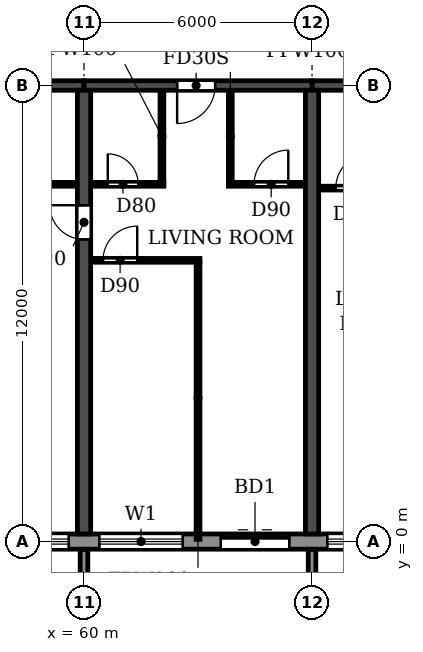
"""IFC4 building model, lengths in metres.
Left out: names, types, materials, properties, quantities, classifications, styles, units other than length and angle.
Written with IfcOpenShell. Run it as: python <this file> out.ifc"""

import sys

from ifc_helpers import new_model, si_unit, direction, frame, frame_2d, origin, place, context, subcontext, project, spatial, polyline, rectangle, outline, extrude, source, transform, mapped, element, fill, save


model = new_model("IFC4")
c1 = context("Model", 3, precision=1e-05, world=origin(), true_north=direction((0.0, 1.0)))
c2 = subcontext(c1, "Body", "Model", "MODEL_VIEW")
j1 = project(units=[si_unit("LENGTHUNIT", "METRE"), si_unit("PLANEANGLEUNIT", "RADIAN")], contexts=[c1])
p1 = place(None, origin())
s1 = spatial("IfcSite", under=j1, at=p1, CompositionType="ELEMENT")
p2 = place(p1, origin())
s2 = spatial("IfcBuilding", under=s1, at=p2, CompositionType="ELEMENT")
p3 = place(p2, frame((0.0, 0.0, 112.5)))
s3 = spatial("IfcBuildingStorey", under=s2, at=p3, CompositionType="ELEMENT", Elevation=112.5)
p4 = place(p3, frame((60.0, 0.2, 0.0), z_axis=(0.0, 0.0, 1.0), x_axis=(0.0, 1.0, 0.0)))
e1 = element("IfcWall", 1, at=p4, inside=s3, PredefinedType="SHEAR", context=c2, shape_type="SweptSolid", body=[
    extrude(rectangle(XDim=11.675, YDim=0.35, at=frame_2d((5.837, 0.0))), origin(), (0.0, 0.0, 1.0), 2.95),
])
p5 = place(p4, frame((7.75, 0.0, 0.0)))
e2 = element("IfcOpeningElement", 2, at=p5, cuts=e1, PredefinedType="OPENING", context=c2, shape_type="SweptSolid", body=[
    extrude(rectangle(XDim=0.9, YDim=2.1, at=frame_2d((0.45, 1.05))), frame((0.0, 0.185, 0.0), z_axis=(0.0, -1.0, 0.0), x_axis=(1.0, 0.0, 0.0)), (0.0, 0.0, 1.0), 0.37),
])
p6 = place(p3, frame((66.0, 0.2, 0.0), z_axis=(0.0, 0.0, 1.0), x_axis=(0.0, 1.0, 0.0)))
e3 = element("IfcWall", 3, at=p6, inside=s3, PredefinedType="SHEAR", context=c2, shape_type="SweptSolid", body=[
    extrude(rectangle(XDim=11.675, YDim=0.35, at=frame_2d((5.837, 0.0))), origin(), (0.0, 0.0, 1.0), 2.95),
])
p7 = place(p3, frame((54.0, 12.0, 0.0), z_axis=(0.0, 0.0, 1.0), x_axis=(1.0, 0.0, 0.0)))
e4 = element("IfcWall", 4, at=p7, inside=s3, PredefinedType="SHEAR", context=c2, shape_type="SweptSolid", body=[
    extrude(rectangle(XDim=6.0, YDim=0.25, at=frame_2d((3.0, 0.0))), origin(), (0.0, 0.0, 1.0), 2.35),
])
p8 = place(p3, frame((60.0, 12.0, 0.0), z_axis=(0.0, 0.0, 1.0), x_axis=(1.0, 0.0, 0.0)))
e5 = element("IfcWall", 5, at=p8, inside=s3, PredefinedType="SHEAR", context=c2, shape_type="SweptSolid", body=[
    extrude(rectangle(XDim=6.0, YDim=0.25, at=frame_2d((3.0, 0.0))), origin(), (0.0, 0.0, 1.0), 2.35),
])
p9 = place(p8, frame((2.45, 0.0, 0.0)))
e6 = element("IfcOpeningElement", 6, at=p9, cuts=e5, PredefinedType="OPENING", context=c2, shape_type="SweptSolid", body=[
    extrude(rectangle(XDim=1.0, YDim=2.1, at=frame_2d((0.5, 1.05))), frame((0.0, 0.135, 0.0), z_axis=(0.0, -1.0, 0.0), x_axis=(1.0, 0.0, 0.0)), (0.0, 0.0, 1.0), 0.27),
])
p10 = place(p3, frame((66.0, 12.0, 0.0), z_axis=(0.0, 0.0, 1.0), x_axis=(1.0, 0.0, 0.0)))
e7 = element("IfcWall", 7, at=p10, inside=s3, PredefinedType="SHEAR", context=c2, shape_type="SweptSolid", body=[
    extrude(rectangle(XDim=6.0, YDim=0.25, at=frame_2d((3.0, 0.0))), origin(), (0.0, 0.0, 1.0), 2.35),
])
p11 = place(p10, frame((2.55, 0.0, 0.0)))
e8 = element("IfcOpeningElement", 8, at=p11, cuts=e7, PredefinedType="OPENING", context=c2, shape_type="SweptSolid", body=[
    extrude(rectangle(XDim=1.0, YDim=2.1, at=frame_2d((0.5, 1.05))), frame((0.0, 0.135, 0.0), z_axis=(0.0, -1.0, 0.0), x_axis=(1.0, 0.0, 0.0)), (0.0, 0.0, 1.0), 0.27),
])
p12 = place(p3, frame((16.683, 0.0, 0.0), z_axis=(0.0, 0.0, 1.0), x_axis=(1.0, 0.0, 0.0)))
e9 = element("IfcWall", 9, at=p12, inside=s3, PredefinedType="STANDARD", context=c2, shape_type="SweptSolid", body=[
    extrude(rectangle(XDim=68.634, YDim=0.4, at=frame_2d((34.317, 0.0))), origin(), (0.0, 0.0, 1.0), 2.95),
])
p13 = place(p12, frame((1.717, 0.0, 0.9)))
e10 = element("IfcOpeningElement", 10, at=p13, cuts=e9, PredefinedType="OPENING", context=c2, shape_type="SweptSolid", body=[
    extrude(rectangle(XDim=2.2, YDim=1.5, at=frame_2d((1.1, 0.75))), frame((0.0, 0.21, 0.0), z_axis=(0.0, -1.0, 0.0), x_axis=(1.0, 0.0, 0.0)), (0.0, 0.0, 1.0), 0.42),
])
p14 = place(p12, frame((4.717, 0.0, 0.9)))
e11 = element("IfcOpeningElement", 11, at=p14, cuts=e9, PredefinedType="OPENING", context=c2, shape_type="SweptSolid", body=[
    extrude(rectangle(XDim=2.2, YDim=1.5, at=frame_2d((1.1, 0.75))), frame((0.0, 0.21, 0.0), z_axis=(0.0, -1.0, 0.0), x_axis=(1.0, 0.0, 0.0)), (0.0, 0.0, 1.0), 0.42),
])
p15 = place(p12, frame((7.717, 0.0, 0.9)))
e12 = element("IfcOpeningElement", 12, at=p15, cuts=e9, PredefinedType="OPENING", context=c2, shape_type="SweptSolid", body=[
    extrude(rectangle(XDim=2.2, YDim=1.5, at=frame_2d((1.1, 0.75))), frame((0.0, 0.21, 0.0), z_axis=(0.0, -1.0, 0.0), x_axis=(1.0, 0.0, 0.0)), (0.0, 0.0, 1.0), 0.42),
])
p16 = place(p12, frame((10.917, 0.0, 0.0)))
e13 = element("IfcOpeningElement", 13, at=p16, cuts=e9, PredefinedType="OPENING", context=c2, shape_type="SweptSolid", body=[
    extrude(rectangle(XDim=1.8, YDim=2.4, at=frame_2d((0.9, 1.2))), frame((0.0, 0.21, 0.0), z_axis=(0.0, -1.0, 0.0), x_axis=(1.0, 0.0, 0.0)), (0.0, 0.0, 1.0), 0.42),
])
p17 = place(p12, frame((13.717, 0.0, 0.9)))
e14 = element("IfcOpeningElement", 14, at=p17, cuts=e9, PredefinedType="OPENING", context=c2, shape_type="SweptSolid", body=[
    extrude(rectangle(XDim=2.2, YDim=1.5, at=frame_2d((1.1, 0.75))), frame((0.0, 0.21, 0.0), z_axis=(0.0, -1.0, 0.0), x_axis=(1.0, 0.0, 0.0)), (0.0, 0.0, 1.0), 0.42),
])
p18 = place(p12, frame((16.717, 0.0, 0.9)))
e15 = element("IfcOpeningElement", 15, at=p18, cuts=e9, PredefinedType="OPENING", context=c2, shape_type="SweptSolid", body=[
    extrude(rectangle(XDim=2.2, YDim=1.5, at=frame_2d((1.1, 0.75))), frame((0.0, 0.21, 0.0), z_axis=(0.0, -1.0, 0.0), x_axis=(1.0, 0.0, 0.0)), (0.0, 0.0, 1.0), 0.42),
])
p19 = place(p12, frame((19.717, 0.0, 0.9)))
e16 = element("IfcOpeningElement", 16, at=p19, cuts=e9, PredefinedType="OPENING", context=c2, shape_type="SweptSolid", body=[
    extrude(rectangle(XDim=2.2, YDim=1.5, at=frame_2d((1.1, 0.75))), frame((0.0, 0.21, 0.0), z_axis=(0.0, -1.0, 0.0), x_axis=(1.0, 0.0, 0.0)), (0.0, 0.0, 1.0), 0.42),
])
p20 = place(p12, frame((22.717, 0.0, 0.9)))
e17 = element("IfcOpeningElement", 17, at=p20, cuts=e9, PredefinedType="OPENING", context=c2, shape_type="SweptSolid", body=[
    extrude(rectangle(XDim=2.2, YDim=1.5, at=frame_2d((1.1, 0.75))), frame((0.0, 0.21, 0.0), z_axis=(0.0, -1.0, 0.0), x_axis=(1.0, 0.0, 0.0)), (0.0, 0.0, 1.0), 0.42),
])
p21 = place(p12, frame((25.717, 0.0, 0.9)))
e18 = element("IfcOpeningElement", 18, at=p21, cuts=e9, PredefinedType="OPENING", context=c2, shape_type="SweptSolid", body=[
    extrude(rectangle(XDim=2.2, YDim=1.5, at=frame_2d((1.1, 0.75))), frame((0.0, 0.21, 0.0), z_axis=(0.0, -1.0, 0.0), x_axis=(1.0, 0.0, 0.0)), (0.0, 0.0, 1.0), 0.42),
])
p22 = place(p12, frame((28.717, 0.0, 0.9)))
e19 = element("IfcOpeningElement", 19, at=p22, cuts=e9, PredefinedType="OPENING", context=c2, shape_type="SweptSolid", body=[
    extrude(rectangle(XDim=2.2, YDim=1.5, at=frame_2d((1.1, 0.75))), frame((0.0, 0.21, 0.0), z_axis=(0.0, -1.0, 0.0), x_axis=(1.0, 0.0, 0.0)), (0.0, 0.0, 1.0), 0.42),
])
p23 = place(p12, frame((31.917, 0.0, 0.0)))
e20 = element("IfcOpeningElement", 20, at=p23, cuts=e9, PredefinedType="OPENING", context=c2, shape_type="SweptSolid", body=[
    extrude(rectangle(XDim=1.8, YDim=2.4, at=frame_2d((0.9, 1.2))), frame((0.0, 0.21, 0.0), z_axis=(0.0, -1.0, 0.0), x_axis=(1.0, 0.0, 0.0)), (0.0, 0.0, 1.0), 0.42),
])
p24 = place(p12, frame((34.717, 0.0, 0.9)))
e21 = element("IfcOpeningElement", 21, at=p24, cuts=e9, PredefinedType="OPENING", context=c2, shape_type="SweptSolid", body=[
    extrude(rectangle(XDim=2.2, YDim=1.5, at=frame_2d((1.1, 0.75))), frame((0.0, 0.21, 0.0), z_axis=(0.0, -1.0, 0.0), x_axis=(1.0, 0.0, 0.0)), (0.0, 0.0, 1.0), 0.42),
])
p25 = place(p12, frame((37.717, 0.0, 0.9)))
e22 = element("IfcOpeningElement", 22, at=p25, cuts=e9, PredefinedType="OPENING", context=c2, shape_type="SweptSolid", body=[
    extrude(rectangle(XDim=2.2, YDim=1.5, at=frame_2d((1.1, 0.75))), frame((0.0, 0.21, 0.0), z_axis=(0.0, -1.0, 0.0), x_axis=(1.0, 0.0, 0.0)), (0.0, 0.0, 1.0), 0.42),
])
p26 = place(p12, frame((40.717, 0.0, 0.9)))
e23 = element("IfcOpeningElement", 23, at=p26, cuts=e9, PredefinedType="OPENING", context=c2, shape_type="SweptSolid", body=[
    extrude(rectangle(XDim=2.2, YDim=1.5, at=frame_2d((1.1, 0.75))), frame((0.0, 0.21, 0.0), z_axis=(0.0, -1.0, 0.0), x_axis=(1.0, 0.0, 0.0)), (0.0, 0.0, 1.0), 0.42),
])
p27 = place(p12, frame((43.717, 0.0, 0.9)))
e24 = element("IfcOpeningElement", 24, at=p27, cuts=e9, PredefinedType="OPENING", context=c2, shape_type="SweptSolid", body=[
    extrude(rectangle(XDim=2.2, YDim=1.5, at=frame_2d((1.1, 0.75))), frame((0.0, 0.21, 0.0), z_axis=(0.0, -1.0, 0.0), x_axis=(1.0, 0.0, 0.0)), (0.0, 0.0, 1.0), 0.42),
])
p28 = place(p12, frame((46.917, 0.0, 0.0)))
e25 = element("IfcOpeningElement", 25, at=p28, cuts=e9, PredefinedType="OPENING", context=c2, shape_type="SweptSolid", body=[
    extrude(rectangle(XDim=1.8, YDim=2.4, at=frame_2d((0.9, 1.2))), frame((0.0, 0.21, 0.0), z_axis=(0.0, -1.0, 0.0), x_axis=(1.0, 0.0, 0.0)), (0.0, 0.0, 1.0), 0.42),
])
p29 = place(p12, frame((49.717, 0.0, 0.9)))
e26 = element("IfcOpeningElement", 26, at=p29, cuts=e9, PredefinedType="OPENING", context=c2, shape_type="SweptSolid", body=[
    extrude(rectangle(XDim=2.2, YDim=1.5, at=frame_2d((1.1, 0.75))), frame((0.0, 0.21, 0.0), z_axis=(0.0, -1.0, 0.0), x_axis=(1.0, 0.0, 0.0)), (0.0, 0.0, 1.0), 0.42),
])
p30 = place(p12, frame((52.717, 0.0, 0.9)))
e27 = element("IfcOpeningElement", 27, at=p30, cuts=e9, PredefinedType="OPENING", context=c2, shape_type="SweptSolid", body=[
    extrude(rectangle(XDim=2.2, YDim=1.5, at=frame_2d((1.1, 0.75))), frame((0.0, 0.21, 0.0), z_axis=(0.0, -1.0, 0.0), x_axis=(1.0, 0.0, 0.0)), (0.0, 0.0, 1.0), 0.42),
])
p31 = place(p12, frame((55.717, 0.0, 0.9)))
e28 = element("IfcOpeningElement", 28, at=p31, cuts=e9, PredefinedType="OPENING", context=c2, shape_type="SweptSolid", body=[
    extrude(rectangle(XDim=2.2, YDim=1.5, at=frame_2d((1.1, 0.75))), frame((0.0, 0.21, 0.0), z_axis=(0.0, -1.0, 0.0), x_axis=(1.0, 0.0, 0.0)), (0.0, 0.0, 1.0), 0.42),
])
p32 = place(p12, frame((58.717, 0.0, 0.9)))
e29 = element("IfcOpeningElement", 29, at=p32, cuts=e9, PredefinedType="OPENING", context=c2, shape_type="SweptSolid", body=[
    extrude(rectangle(XDim=2.2, YDim=1.5, at=frame_2d((1.1, 0.75))), frame((0.0, 0.21, 0.0), z_axis=(0.0, -1.0, 0.0), x_axis=(1.0, 0.0, 0.0)), (0.0, 0.0, 1.0), 0.42),
])
p33 = place(p12, frame((61.717, 0.0, 0.9)))
e30 = element("IfcOpeningElement", 30, at=p33, cuts=e9, PredefinedType="OPENING", context=c2, shape_type="SweptSolid", body=[
    extrude(rectangle(XDim=2.2, YDim=1.5, at=frame_2d((1.1, 0.75))), frame((0.0, 0.21, 0.0), z_axis=(0.0, -1.0, 0.0), x_axis=(1.0, 0.0, 0.0)), (0.0, 0.0, 1.0), 0.42),
])
p34 = place(p12, frame((64.717, 0.0, 0.9)))
e31 = element("IfcOpeningElement", 31, at=p34, cuts=e9, PredefinedType="OPENING", context=c2, shape_type="SweptSolid", body=[
    extrude(rectangle(XDim=2.2, YDim=1.5, at=frame_2d((1.1, 0.75))), frame((0.0, 0.21, 0.0), z_axis=(0.0, -1.0, 0.0), x_axis=(1.0, 0.0, 0.0)), (0.0, 0.0, 1.0), 0.42),
])
m1 = source(origin(), c2, "Body", "SweptSolid", [
    extrude(outline(polyline([(0.0, 0.0), (0.2, 0.0), (0.2, 1.65), (0.0, 1.65), (0.0, 0.0)])), origin(), (0.0, 0.0, 1.0), 3.1),
])
for number, where in (
    (32, (59.9, -1.85, 0.0)),
    (33, (65.9, -1.85, 0.0)),
):
    element("IfcWall", number, at=place(p3, frame(where)), inside=s3, PredefinedType="STANDARD", context=c2, shape_type="MappedRepresentation", body=[
        mapped(m1, transform((0.0, 0.0, 0.0))),
    ])
p35 = place(p3, frame((60.185, 7.4, 0.0), z_axis=(0.0, 0.0, 1.0), x_axis=(1.0, 0.0, 0.0)))
e34 = element("IfcWall", 34, at=p35, inside=s3, PredefinedType="PARTITIONING", context=c2, shape_type="SweptSolid", body=[
    extrude(rectangle(XDim=2.865, YDim=0.1, at=frame_2d((1.433, 0.0))), origin(), (0.0, 0.0, 1.0), 2.95),
])
p36 = place(p35, frame((0.315, 0.0, 0.0)))
e35 = element("IfcOpeningElement", 35, at=p36, cuts=e34, PredefinedType="OPENING", context=c2, shape_type="SweptSolid", body=[
    extrude(rectangle(XDim=0.9, YDim=2.1, at=frame_2d((0.45, 1.05))), frame((0.0, 0.06, 0.0), z_axis=(0.0, -1.0, 0.0), x_axis=(1.0, 0.0, 0.0)), (0.0, 0.0, 1.0), 0.12),
])
p37 = place(p3, frame((66.185, 9.3, 0.0), z_axis=(0.0, 0.0, 1.0), x_axis=(1.0, 0.0, 0.0)))
e36 = element("IfcWall", 36, at=p37, inside=s3, PredefinedType="PARTITIONING", context=c2, shape_type="SweptSolid", body=[
    extrude(rectangle(XDim=2.015, YDim=0.1, at=frame_2d((1.007, 0.0))), origin(), (0.0, 0.0, 1.0), 2.95),
])
p38 = place(p37, frame((0.44, 0.0, 0.0)))
e37 = element("IfcOpeningElement", 37, at=p38, cuts=e36, PredefinedType="OPENING", context=c2, shape_type="SweptSolid", body=[
    extrude(rectangle(XDim=0.9, YDim=2.1, at=frame_2d((0.45, 1.05))), frame((0.0, 0.06, 0.0), z_axis=(0.0, -1.0, 0.0), x_axis=(1.0, 0.0, 0.0)), (0.0, 0.0, 1.0), 0.12),
])
p39 = place(p3, frame((57.1, 9.4, 0.0), z_axis=(0.0, 0.0, 1.0), x_axis=(1.0, 0.0, 0.0)))
e38 = element("IfcWall", 38, at=p39, inside=s3, PredefinedType="PARTITIONING", context=c2, shape_type="SweptSolid", body=[
    extrude(rectangle(XDim=2.715, YDim=0.1, at=frame_2d((1.357, 0.0))), origin(), (0.0, 0.0, 1.0), 2.95),
])
p40 = place(p39, frame((1.0, 0.0, 0.0)))
e39 = element("IfcOpeningElement", 39, at=p40, cuts=e38, PredefinedType="OPENING", context=c2, shape_type="SweptSolid", body=[
    extrude(rectangle(XDim=0.8, YDim=2.1, at=frame_2d((0.4, 1.05))), frame((0.0, 0.06, 0.0), z_axis=(0.0, -1.0, 0.0), x_axis=(1.0, 0.0, 0.0)), (0.0, 0.0, 1.0), 0.12),
])
p41 = place(p3, frame((60.185, 9.4, 0.0), z_axis=(0.0, 0.0, 1.0), x_axis=(1.0, 0.0, 0.0)))
e40 = element("IfcWall", 40, at=p41, inside=s3, PredefinedType="PARTITIONING", context=c2, shape_type="SweptSolid", body=[
    extrude(rectangle(XDim=1.915, YDim=0.1, at=frame_2d((0.958, 0.0))), origin(), (0.0, 0.0, 1.0), 2.95),
])
p42 = place(p41, frame((0.44, 0.0, 0.0)))
e41 = element("IfcOpeningElement", 41, at=p42, cuts=e40, PredefinedType="OPENING", context=c2, shape_type="SweptSolid", body=[
    extrude(rectangle(XDim=0.8, YDim=2.1, at=frame_2d((0.4, 1.05))), frame((0.0, 0.06, 0.0), z_axis=(0.0, -1.0, 0.0), x_axis=(1.0, 0.0, 0.0)), (0.0, 0.0, 1.0), 0.12),
])
p43 = place(p3, frame((63.8, 9.4, 0.0), z_axis=(0.0, 0.0, 1.0), x_axis=(1.0, 0.0, 0.0)))
e42 = element("IfcWall", 42, at=p43, inside=s3, PredefinedType="PARTITIONING", context=c2, shape_type="SweptSolid", body=[
    extrude(rectangle(XDim=2.015, YDim=0.1, at=frame_2d((1.007, 0.0))), origin(), (0.0, 0.0, 1.0), 2.95),
])
p44 = place(p43, frame((0.675, 0.0, 0.0)))
e43 = element("IfcOpeningElement", 43, at=p44, cuts=e42, PredefinedType="OPENING", context=c2, shape_type="SweptSolid", body=[
    extrude(rectangle(XDim=0.9, YDim=2.1, at=frame_2d((0.45, 1.05))), frame((0.0, 0.06, 0.0), z_axis=(0.0, -1.0, 0.0), x_axis=(1.0, 0.0, 0.0)), (0.0, 0.0, 1.0), 0.12),
])
p45 = place(p3, frame((62.05, 9.45, 0.0), z_axis=(0.0, 0.0, 1.0), x_axis=(0.0, 1.0, 0.0)))
e44 = element("IfcWall", 44, at=p45, inside=s3, PredefinedType="PARTITIONING", context=c2, shape_type="SweptSolid", body=[
    extrude(rectangle(XDim=2.415, YDim=0.1, at=frame_2d((1.208, 0.0))), origin(), (0.0, 0.0, 1.0), 2.95),
])
p46 = place(p3, frame((63.0, 0.06, 0.0), z_axis=(0.0, 0.0, 1.0), x_axis=(0.0, 1.0, 0.0)))
e45 = element("IfcWall", 45, at=p46, inside=s3, PredefinedType="PARTITIONING", context=c2, shape_type="SweptSolid", body=[
    extrude(rectangle(XDim=7.29, YDim=0.1, at=frame_2d((3.645, 0.0))), origin(), (0.0, 0.0, 1.0), 2.95),
])
p47 = place(p3, frame((63.85, 9.45, 0.0), z_axis=(0.0, 0.0, 1.0), x_axis=(0.0, 1.0, 0.0)))
e46 = element("IfcWall", 46, at=p47, inside=s3, PredefinedType="PARTITIONING", context=c2, shape_type="SweptSolid", body=[
    extrude(rectangle(XDim=2.415, YDim=0.1, at=frame_2d((1.208, 0.0))), origin(), (0.0, 0.0, 1.0), 2.95),
])
p48 = place(p26, origin())
e47 = element("IfcWindow", 47, at=p48, inside=s3, PartitioningType="DOUBLE_PANEL_HORIZONTAL", PredefinedType="WINDOW", context=c2, shape_type="SweptSolid", body=[
    extrude(rectangle(XDim=2.2, YDim=1.5, at=frame_2d((1.1, 0.75))), frame((0.0, 0.03, 0.0), z_axis=(0.0, -1.0, 0.0), x_axis=(1.0, 0.0, 0.0)), (0.0, 0.0, 1.0), 0.06),
])
fill(e23, e47)
p49 = place(p27, origin())
e48 = element("IfcWindow", 48, at=p49, inside=s3, PartitioningType="DOUBLE_PANEL_HORIZONTAL", PredefinedType="WINDOW", context=c2, shape_type="SweptSolid", body=[
    extrude(rectangle(XDim=2.2, YDim=1.5, at=frame_2d((1.1, 0.75))), frame((0.0, 0.03, 0.0), z_axis=(0.0, -1.0, 0.0), x_axis=(1.0, 0.0, 0.0)), (0.0, 0.0, 1.0), 0.06),
])
fill(e24, e48)
p50 = place(p28, origin())
e49 = element("IfcDoor", 49, at=p50, inside=s3, OperationType="DOUBLE_DOOR_SLIDING", PredefinedType="DOOR", context=c2, shape_type="SweptSolid", body=[
    extrude(rectangle(XDim=1.8, YDim=2.4, at=frame_2d((0.9, 1.2))), frame((0.0, 0.025, 0.0), z_axis=(0.0, -1.0, 0.0), x_axis=(1.0, 0.0, 0.0)), (0.0, 0.0, 1.0), 0.05),
])
fill(e25, e49)
p51 = place(p29, origin())
e50 = element("IfcWindow", 50, at=p51, inside=s3, PartitioningType="DOUBLE_PANEL_HORIZONTAL", PredefinedType="WINDOW", context=c2, shape_type="SweptSolid", body=[
    extrude(rectangle(XDim=2.2, YDim=1.5, at=frame_2d((1.1, 0.75))), frame((0.0, 0.03, 0.0), z_axis=(0.0, -1.0, 0.0), x_axis=(1.0, 0.0, 0.0)), (0.0, 0.0, 1.0), 0.06),
])
fill(e26, e50)
p52 = place(p5, origin())
e51 = element("IfcDoor", 51, at=p52, inside=s3, OperationType="SINGLE_SWING_RIGHT", PredefinedType="DOOR", context=c2, shape_type="SweptSolid", body=[
    extrude(rectangle(XDim=0.9, YDim=2.1, at=frame_2d((0.45, 1.05))), frame((0.0, 0.025, 0.0), z_axis=(0.0, -1.0, 0.0), x_axis=(1.0, 0.0, 0.0)), (0.0, 0.0, 1.0), 0.05),
])
fill(e2, e51)
p53 = place(p36, origin())
e52 = element("IfcDoor", 52, at=p53, inside=s3, OperationType="SINGLE_SWING_RIGHT", PredefinedType="DOOR", context=c2, shape_type="SweptSolid", body=[
    extrude(rectangle(XDim=0.9, YDim=2.1, at=frame_2d((0.45, 1.05))), frame((0.0, 0.025, 0.0), z_axis=(0.0, -1.0, 0.0), x_axis=(1.0, 0.0, 0.0)), (0.0, 0.0, 1.0), 0.05),
])
fill(e35, e52)
p54 = place(p42, origin())
e53 = element("IfcDoor", 53, at=p54, inside=s3, OperationType="SINGLE_SWING_LEFT", PredefinedType="DOOR", context=c2, shape_type="SweptSolid", body=[
    extrude(rectangle(XDim=0.8, YDim=2.1, at=frame_2d((0.4, 1.05))), frame((0.0, 0.025, 0.0), z_axis=(0.0, -1.0, 0.0), x_axis=(1.0, 0.0, 0.0)), (0.0, 0.0, 1.0), 0.05),
])
fill(e41, e53)
p55 = place(p9, frame((1.0, 0.0, 0.0), z_axis=(0.0, 0.0, 1.0), x_axis=(-1.0, 0.0, 0.0)))
e54 = element("IfcDoor", 54, at=p55, inside=s3, OperationType="SINGLE_SWING_RIGHT", PredefinedType="DOOR", context=c2, shape_type="SweptSolid", body=[
    extrude(rectangle(XDim=1.0, YDim=2.1, at=frame_2d((0.5, 1.05))), frame((0.0, 0.025, 0.0), z_axis=(0.0, -1.0, 0.0), x_axis=(1.0, 0.0, 0.0)), (0.0, 0.0, 1.0), 0.05),
])
fill(e6, e54)
p56 = place(p44, origin())
e55 = element("IfcDoor", 55, at=p56, inside=s3, OperationType="SINGLE_SWING_RIGHT", PredefinedType="DOOR", context=c2, shape_type="SweptSolid", body=[
    extrude(rectangle(XDim=0.9, YDim=2.1, at=frame_2d((0.45, 1.05))), frame((0.0, 0.025, 0.0), z_axis=(0.0, -1.0, 0.0), x_axis=(1.0, 0.0, 0.0)), (0.0, 0.0, 1.0), 0.05),
])
fill(e43, e55)
p57 = place(p38, origin())
e56 = element("IfcDoor", 56, at=p57, inside=s3, OperationType="SINGLE_SWING_RIGHT", PredefinedType="DOOR", context=c2, shape_type="SweptSolid", body=[
    extrude(rectangle(XDim=0.9, YDim=2.1, at=frame_2d((0.45, 1.05))), frame((0.0, 0.025, 0.0), z_axis=(0.0, -1.0, 0.0), x_axis=(1.0, 0.0, 0.0)), (0.0, 0.0, 1.0), 0.05),
])
fill(e37, e56)
save(model, sys.argv[1])
